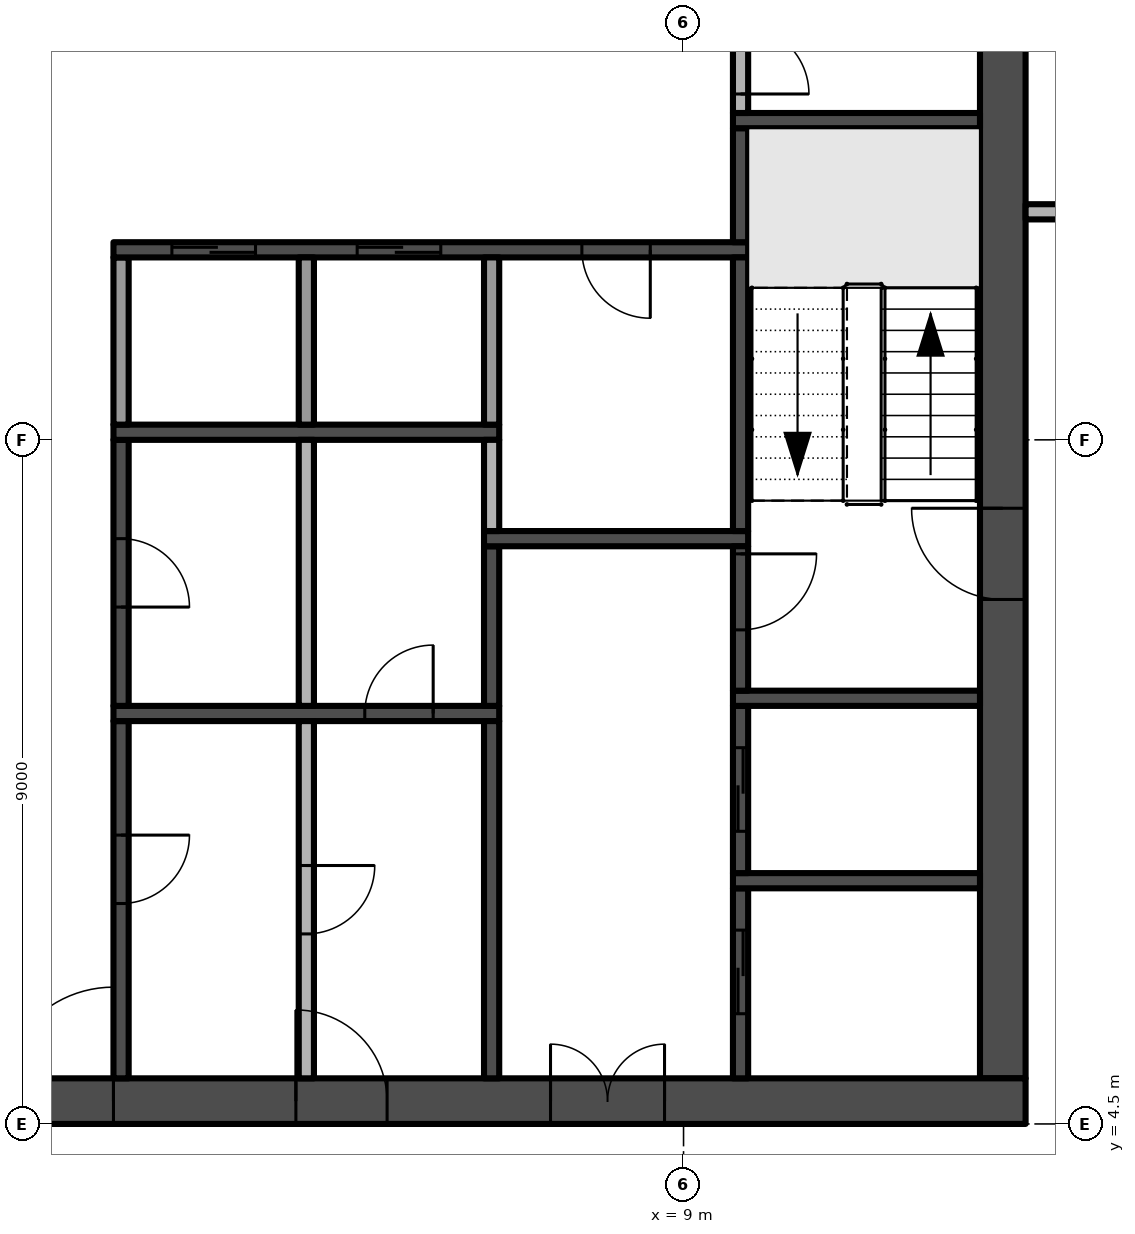
"""IFC4 building model, lengths in metres.
Left out: names, types, materials, properties, quantities, classifications, styles, units other than length and angle.
Written with IfcOpenShell. Run it as: python <this file> out.ifc"""

import sys

from ifc_helpers import new_model, si_unit, direction, frame, frame_2d, origin, place, context, subcontext, project, spatial, rectangle, extrude, element, fill, save


model = new_model("IFC4")
c1 = context("Model", 3, precision=1e-05, world=origin(), true_north=direction((0.0, 1.0)))
c2 = subcontext(c1, "Body", "Model", "MODEL_VIEW")
j1 = project(units=[si_unit("LENGTHUNIT", "METRE"), si_unit("PLANEANGLEUNIT", "RADIAN")], contexts=[c1])
p1 = place(None, origin())
s1 = spatial("IfcSite", under=j1, at=p1, CompositionType="ELEMENT")
p2 = place(p1, origin())
s2 = spatial("IfcBuilding", under=s1, at=p2, CompositionType="ELEMENT")
p3 = place(p2, frame((0.0, 0.0, 246.4)))
s3 = spatial("IfcBuildingStorey", under=s2, at=p3, CompositionType="ELEMENT", Elevation=246.4)
p4 = place(p3, frame((-13.5, 4.8, -0.3), z_axis=(0.0, 0.0, 1.0), x_axis=(1.0, 0.0, 0.0)))
e1 = element("IfcWall", 1, at=p4, inside=s3, PredefinedType="SHEAR", context=c2, shape_type="SweptSolid", body=[
    extrude(rectangle(XDim=27.0, YDim=0.6, at=frame_2d((13.5, 0.0))), origin(), (0.0, 0.0, 1.0), 3.8),
])
p5 = place(p4, frame((12.0, 0.0, 0.3)))
e2 = element("IfcOpeningElement", 2, at=p5, cuts=e1, PredefinedType="OPENING", context=c2, shape_type="SweptSolid", body=[
    extrude(rectangle(XDim=3.0, YDim=2.4, at=frame_2d((1.5, 1.2))), frame((0.0, 0.31, 0.0), z_axis=(0.0, -1.0, 0.0), x_axis=(1.0, 0.0, 0.0)), (0.0, 0.0, 1.0), 0.62),
])
p6 = place(p4, frame((4.9, 0.0, 0.3)))
e3 = element("IfcOpeningElement", 3, at=p6, cuts=e1, PredefinedType="OPENING", context=c2, shape_type="SweptSolid", body=[
    extrude(rectangle(XDim=1.2, YDim=2.2, at=frame_2d((0.6, 1.1))), frame((0.0, 0.31, 0.0), z_axis=(0.0, -1.0, 0.0), x_axis=(1.0, 0.0, 0.0)), (0.0, 0.0, 1.0), 0.62),
])
p7 = place(p4, frame((20.75, 0.0, 0.3)))
e4 = element("IfcOpeningElement", 4, at=p7, cuts=e1, PredefinedType="OPENING", context=c2, shape_type="SweptSolid", body=[
    extrude(rectangle(XDim=1.5, YDim=2.2, at=frame_2d((0.75, 1.1))), frame((0.0, 0.31, 0.0), z_axis=(0.0, -1.0, 0.0), x_axis=(1.0, 0.0, 0.0)), (0.0, 0.0, 1.0), 0.62),
])
p8 = place(p4, frame((17.4, 0.0, 0.3)))
e5 = element("IfcOpeningElement", 5, at=p8, cuts=e1, PredefinedType="OPENING", context=c2, shape_type="SweptSolid", body=[
    extrude(rectangle(XDim=1.2, YDim=2.2, at=frame_2d((0.6, 1.1))), frame((0.0, 0.31, 0.0), z_axis=(0.0, -1.0, 0.0), x_axis=(1.0, 0.0, 0.0)), (0.0, 0.0, 1.0), 0.62),
])
p9 = place(p3, frame((13.2, 5.1, -0.3), z_axis=(0.0, 0.0, 1.0), x_axis=(0.0, 1.0, 0.0)))
e6 = element("IfcWall", 6, at=p9, inside=s3, PredefinedType="SHEAR", context=c2, shape_type="SweptSolid", body=[
    extrude(rectangle(XDim=16.8, YDim=0.6, at=frame_2d((8.4, 0.0))), origin(), (0.0, 0.0, 1.0), 3.8),
])
p10 = place(p9, frame((6.3, 0.0, 0.3)))
e7 = element("IfcOpeningElement", 7, at=p10, cuts=e6, PredefinedType="OPENING", context=c2, shape_type="SweptSolid", body=[
    extrude(rectangle(XDim=1.2, YDim=2.2, at=frame_2d((0.6, 1.1))), frame((0.0, 0.31, 0.0), z_axis=(0.0, -1.0, 0.0), x_axis=(1.0, 0.0, 0.0)), (0.0, 0.0, 1.0), 0.62),
])
p11 = place(p3, frame((1.6, 9.8, 0.0), z_axis=(0.0, 0.0, 1.0), x_axis=(0.0, -1.0, 0.0)))
e8 = element("IfcWall", 8, at=p11, inside=s3, PredefinedType="SHEAR", context=c2, shape_type="SweptSolid", body=[
    extrude(rectangle(XDim=4.7, YDim=0.2, at=frame_2d((2.35, 0.0))), origin(), (0.0, 0.0, 1.0), 3.5),
])
p12 = place(p11, frame((1.5, 0.0, 0.0)))
e9 = element("IfcOpeningElement", 9, at=p12, cuts=e8, PredefinedType="OPENING", context=c2, shape_type="SweptSolid", body=[
    extrude(rectangle(XDim=0.9, YDim=2.1, at=frame_2d((0.45, 1.05))), frame((0.0, 0.11, 0.0), z_axis=(0.0, -1.0, 0.0), x_axis=(1.0, 0.0, 0.0)), (0.0, 0.0, 1.0), 0.22),
])
p13 = place(p3, frame((1.5, 9.9, 0.0), z_axis=(0.0, 0.0, 1.0), x_axis=(1.0, 0.0, 0.0)))
e10 = element("IfcWall", 10, at=p13, inside=s3, PredefinedType="SHEAR", context=c2, shape_type="SweptSolid", body=[
    extrude(rectangle(XDim=5.075, YDim=0.2, at=frame_2d((2.538, 0.0))), origin(), (0.0, 0.0, 1.0), 3.5),
])
p14 = place(p13, frame((3.306, 0.0, 0.0)))
e11 = element("IfcOpeningElement", 11, at=p14, cuts=e10, PredefinedType="OPENING", context=c2, shape_type="SweptSolid", body=[
    extrude(rectangle(XDim=0.9, YDim=2.1, at=frame_2d((0.45, 1.05))), frame((0.0, 0.11, 0.0), z_axis=(0.0, -1.0, 0.0), x_axis=(1.0, 0.0, 0.0)), (0.0, 0.0, 1.0), 0.22),
])
p15 = place(p3, frame((1.6, 13.5, 0.0), z_axis=(0.0, 0.0, 1.0), x_axis=(0.0, -1.0, 0.0)))
e12 = element("IfcWall", 12, at=p15, inside=s3, PredefinedType="SHEAR", context=c2, shape_type="SweptSolid", body=[
    extrude(rectangle(XDim=3.5, YDim=0.2, at=frame_2d((1.75, 0.0))), origin(), (0.0, 0.0, 1.0), 3.5),
])
p16 = place(p15, frame((1.3, 0.0, 0.0)))
e13 = element("IfcOpeningElement", 13, at=p16, cuts=e12, PredefinedType="OPENING", context=c2, shape_type="SweptSolid", body=[
    extrude(rectangle(XDim=0.9, YDim=2.1, at=frame_2d((0.45, 1.05))), frame((0.0, 0.11, 0.0), z_axis=(0.0, -1.0, 0.0), x_axis=(1.0, 0.0, 0.0)), (0.0, 0.0, 1.0), 0.22),
])
p17 = place(p3, frame((1.5, 13.6, 0.0), z_axis=(0.0, 0.0, 1.0), x_axis=(1.0, 0.0, 0.0)))
e14 = element("IfcWall", 14, at=p17, inside=s3, PredefinedType="SHEAR", context=c2, shape_type="SweptSolid", body=[
    extrude(rectangle(XDim=5.075, YDim=0.2, at=frame_2d((2.538, 0.0))), origin(), (0.0, 0.0, 1.0), 3.5),
])
p18 = place(p3, frame((1.6, 13.7, 0.0), z_axis=(0.0, 0.0, 1.0), x_axis=(0.0, 1.0, 0.0)))
e15 = element("IfcWall", 15, at=p18, inside=s3, PredefinedType="PARTITIONING", context=c2, shape_type="SweptSolid", body=[
    extrude(rectangle(XDim=2.2, YDim=0.2, at=frame_2d((1.1, 0.0))), origin(), (0.0, 0.0, 1.0), 3.5),
])
p19 = place(p3, frame((9.85, 16.0, 0.0), z_axis=(0.0, 0.0, 1.0), x_axis=(-1.0, 0.0, 0.0)))
e16 = element("IfcWall", 16, at=p19, inside=s3, PredefinedType="SHEAR", context=c2, shape_type="SweptSolid", body=[
    extrude(rectangle(XDim=8.35, YDim=0.2, at=frame_2d((4.175, 0.0))), origin(), (0.0, 0.0, 1.0), 3.5),
])
p20 = place(p19, frame((6.481, 0.0, 0.0)))
e17 = element("IfcOpeningElement", 17, at=p20, cuts=e16, PredefinedType="OPENING", context=c2, shape_type="SweptSolid", body=[
    extrude(rectangle(XDim=1.1, YDim=2.1, at=frame_2d((0.55, 1.05))), frame((0.0, 0.11, 0.0), z_axis=(0.0, -1.0, 0.0), x_axis=(1.0, 0.0, 0.0)), (0.0, 0.0, 1.0), 0.22),
])
p21 = place(p19, frame((4.044, 0.0, 0.0)))
e18 = element("IfcOpeningElement", 18, at=p21, cuts=e16, PredefinedType="OPENING", context=c2, shape_type="SweptSolid", body=[
    extrude(rectangle(XDim=1.1, YDim=2.1, at=frame_2d((0.55, 1.05))), frame((0.0, 0.11, 0.0), z_axis=(0.0, -1.0, 0.0), x_axis=(1.0, 0.0, 0.0)), (0.0, 0.0, 1.0), 0.22),
])
p22 = place(p19, frame((1.288, 0.0, 0.0)))
e19 = element("IfcOpeningElement", 19, at=p22, cuts=e16, PredefinedType="OPENING", context=c2, shape_type="SweptSolid", body=[
    extrude(rectangle(XDim=0.9, YDim=2.1, at=frame_2d((0.45, 1.05))), frame((0.0, 0.11, 0.0), z_axis=(0.0, -1.0, 0.0), x_axis=(1.0, 0.0, 0.0)), (0.0, 0.0, 1.0), 0.22),
])
p23 = place(p3, frame((4.037, 9.8, 0.0), z_axis=(0.0, 0.0, 1.0), x_axis=(0.0, -1.0, 0.0)))
e20 = element("IfcWall", 20, at=p23, inside=s3, PredefinedType="PARTITIONING", context=c2, shape_type="SweptSolid", body=[
    extrude(rectangle(XDim=4.7, YDim=0.2, at=frame_2d((2.35, 0.0))), origin(), (0.0, 0.0, 1.0), 3.5),
])
p24 = place(p23, frame((1.9, 0.0, 0.0)))
e21 = element("IfcOpeningElement", 21, at=p24, cuts=e20, PredefinedType="OPENING", context=c2, shape_type="SweptSolid", body=[
    extrude(rectangle(XDim=0.9, YDim=2.1, at=frame_2d((0.45, 1.05))), frame((0.0, 0.11, 0.0), z_axis=(0.0, -1.0, 0.0), x_axis=(1.0, 0.0, 0.0)), (0.0, 0.0, 1.0), 0.22),
])
p25 = place(p3, frame((4.037, 10.0, 0.0), z_axis=(0.0, 0.0, 1.0), x_axis=(0.0, 1.0, 0.0)))
e22 = element("IfcWall", 22, at=p25, inside=s3, PredefinedType="PARTITIONING", context=c2, shape_type="SweptSolid", body=[
    extrude(rectangle(XDim=3.5, YDim=0.2, at=frame_2d((1.75, 0.0))), origin(), (0.0, 0.0, 1.0), 3.5),
])
p26 = place(p3, frame((4.037, 13.7, 0.0), z_axis=(0.0, 0.0, 1.0), x_axis=(0.0, 1.0, 0.0)))
e23 = element("IfcWall", 23, at=p26, inside=s3, PredefinedType="PARTITIONING", context=c2, shape_type="SweptSolid", body=[
    extrude(rectangle(XDim=2.2, YDim=0.2, at=frame_2d((1.1, 0.0))), origin(), (0.0, 0.0, 1.0), 3.5),
])
p27 = place(p3, frame((6.475, 5.1, 0.0), z_axis=(0.0, 0.0, 1.0), x_axis=(0.0, 1.0, 0.0)))
e24 = element("IfcWall", 24, at=p27, inside=s3, PredefinedType="SHEAR", context=c2, shape_type="SweptSolid", body=[
    extrude(rectangle(XDim=4.7, YDim=0.2, at=frame_2d((2.35, 0.0))), origin(), (0.0, 0.0, 1.0), 3.5),
])
p28 = place(p3, frame((6.475, 10.0, 0.0), z_axis=(0.0, 0.0, 1.0), x_axis=(0.0, 1.0, 0.0)))
e25 = element("IfcWall", 25, at=p28, inside=s3, PredefinedType="SHEAR", context=c2, shape_type="SweptSolid", body=[
    extrude(rectangle(XDim=2.1, YDim=0.2, at=frame_2d((1.05, 0.0))), origin(), (0.0, 0.0, 1.0), 3.5),
])
p29 = place(p3, frame((6.375, 12.2, 0.0), z_axis=(0.0, 0.0, 1.0), x_axis=(1.0, 0.0, 0.0)))
e26 = element("IfcWall", 26, at=p29, inside=s3, PredefinedType="SHEAR", context=c2, shape_type="SweptSolid", body=[
    extrude(rectangle(XDim=3.475, YDim=0.2, at=frame_2d((1.738, 0.0))), origin(), (0.0, 0.0, 1.0), 3.5),
])
p30 = place(p3, frame((6.475, 12.3, 0.0), z_axis=(0.0, 0.0, 1.0), x_axis=(0.0, 1.0, 0.0)))
e27 = element("IfcWall", 27, at=p30, inside=s3, PredefinedType="PARTITIONING", context=c2, shape_type="SweptSolid", body=[
    extrude(rectangle(XDim=1.2, YDim=0.2, at=frame_2d((0.6, 0.0))), origin(), (0.0, 0.0, 1.0), 3.5),
])
p31 = place(p3, frame((6.475, 13.7, 0.0), z_axis=(0.0, 0.0, 1.0), x_axis=(0.0, 1.0, 0.0)))
e28 = element("IfcWall", 28, at=p31, inside=s3, PredefinedType="PARTITIONING", context=c2, shape_type="SweptSolid", body=[
    extrude(rectangle(XDim=2.2, YDim=0.2, at=frame_2d((1.1, 0.0))), origin(), (0.0, 0.0, 1.0), 3.5),
])
p32 = place(p3, frame((9.75, 5.1, 0.0), z_axis=(0.0, 0.0, 1.0), x_axis=(0.0, 1.0, 0.0)))
e29 = element("IfcWall", 29, at=p32, inside=s3, PredefinedType="SHEAR", context=c2, shape_type="SweptSolid", body=[
    extrude(rectangle(XDim=2.5, YDim=0.2, at=frame_2d((1.25, 0.0))), origin(), (0.0, 0.0, 1.0), 3.5),
])
p33 = place(p32, frame((0.85, 0.0, 0.0)))
e30 = element("IfcOpeningElement", 30, at=p33, cuts=e29, PredefinedType="OPENING", context=c2, shape_type="SweptSolid", body=[
    extrude(rectangle(XDim=1.1, YDim=2.1, at=frame_2d((0.55, 1.05))), frame((0.0, 0.11, 0.0), z_axis=(0.0, -1.0, 0.0), x_axis=(1.0, 0.0, 0.0)), (0.0, 0.0, 1.0), 0.22),
])
p34 = place(p3, frame((9.65, 7.7, 0.0), z_axis=(0.0, 0.0, 1.0), x_axis=(1.0, 0.0, 0.0)))
e31 = element("IfcWall", 31, at=p34, inside=s3, PredefinedType="SHEAR", context=c2, shape_type="SweptSolid", body=[
    extrude(rectangle(XDim=3.25, YDim=0.2, at=frame_2d((1.625, 0.0))), origin(), (0.0, 0.0, 1.0), 3.5),
])
p35 = place(p3, frame((9.75, 7.8, 0.0), z_axis=(0.0, 0.0, 1.0), x_axis=(0.0, 1.0, 0.0)))
e32 = element("IfcWall", 32, at=p35, inside=s3, PredefinedType="SHEAR", context=c2, shape_type="SweptSolid", body=[
    extrude(rectangle(XDim=2.2, YDim=0.2, at=frame_2d((1.1, 0.0))), origin(), (0.0, 0.0, 1.0), 3.5),
])
p36 = place(p35, frame((0.55, 0.0, 0.0)))
e33 = element("IfcOpeningElement", 33, at=p36, cuts=e32, PredefinedType="OPENING", context=c2, shape_type="SweptSolid", body=[
    extrude(rectangle(XDim=1.1, YDim=2.1, at=frame_2d((0.55, 1.05))), frame((0.0, 0.11, 0.0), z_axis=(0.0, -1.0, 0.0), x_axis=(1.0, 0.0, 0.0)), (0.0, 0.0, 1.0), 0.22),
])
p37 = place(p3, frame((9.65, 10.1, 0.0), z_axis=(0.0, 0.0, 1.0), x_axis=(1.0, 0.0, 0.0)))
e34 = element("IfcWall", 34, at=p37, inside=s3, PredefinedType="SHEAR", context=c2, shape_type="SweptSolid", body=[
    extrude(rectangle(XDim=3.25, YDim=0.2, at=frame_2d((1.625, 0.0))), origin(), (0.0, 0.0, 1.0), 3.5),
])
p38 = place(p3, frame((9.75, 12.1, 0.0), z_axis=(0.0, 0.0, 1.0), x_axis=(0.0, -1.0, 0.0)))
e35 = element("IfcWall", 35, at=p38, inside=s3, PredefinedType="SHEAR", context=c2, shape_type="SweptSolid", body=[
    extrude(rectangle(XDim=1.9, YDim=0.2, at=frame_2d((0.95, 0.0))), origin(), (0.0, 0.0, 1.0), 3.5),
])
p39 = place(p38, frame((0.1, 0.0, 0.0)))
e36 = element("IfcOpeningElement", 36, at=p39, cuts=e35, PredefinedType="OPENING", context=c2, shape_type="SweptSolid", body=[
    extrude(rectangle(XDim=1.0, YDim=2.2, at=frame_2d((0.5, 1.1))), frame((0.0, 0.11, 0.0), z_axis=(0.0, -1.0, 0.0), x_axis=(1.0, 0.0, 0.0)), (0.0, 0.0, 1.0), 0.22),
])
p40 = place(p3, frame((9.75, 12.3, 0.0), z_axis=(0.0, 0.0, 1.0), x_axis=(0.0, 1.0, 0.0)))
e37 = element("IfcWall", 37, at=p40, inside=s3, PredefinedType="SHEAR", context=c2, shape_type="SweptSolid", body=[
    extrude(rectangle(XDim=3.6, YDim=0.2, at=frame_2d((1.8, 0.0))), origin(), (0.0, 0.0, 1.0), 3.5),
])
p41 = place(p3, frame((9.75, 16.1, 0.0), z_axis=(0.0, 0.0, 1.0), x_axis=(0.0, 1.0, 0.0)))
e38 = element("IfcWall", 38, at=p41, inside=s3, PredefinedType="SHEAR", context=c2, shape_type="SweptSolid", body=[
    extrude(rectangle(XDim=1.5, YDim=0.2, at=frame_2d((0.75, 0.0))), origin(), (0.0, 0.0, 1.0), 3.5),
])
p42 = place(p3, frame((9.65, 17.7, 0.0), z_axis=(0.0, 0.0, 1.0), x_axis=(1.0, 0.0, 0.0)))
e39 = element("IfcWall", 39, at=p42, inside=s3, PredefinedType="SHEAR", context=c2, shape_type="SweptSolid", body=[
    extrude(rectangle(XDim=3.25, YDim=0.2, at=frame_2d((1.625, 0.0))), origin(), (0.0, 0.0, 1.0), 3.5),
])
p43 = place(p3, frame((9.75, 19.2, 0.0), z_axis=(0.0, 0.0, 1.0), x_axis=(0.0, -1.0, 0.0)))
e40 = element("IfcWall", 40, at=p43, inside=s3, PredefinedType="PARTITIONING", context=c2, shape_type="SweptSolid", body=[
    extrude(rectangle(XDim=1.4, YDim=0.2, at=frame_2d((0.7, 0.0))), origin(), (0.0, 0.0, 1.0), 3.5),
])
p44 = place(p43, frame((0.25, 0.0, 0.0)))
e41 = element("IfcOpeningElement", 41, at=p44, cuts=e40, PredefinedType="OPENING", context=c2, shape_type="SweptSolid", body=[
    extrude(rectangle(XDim=0.9, YDim=2.1, at=frame_2d((0.45, 1.05))), frame((0.0, 0.11, 0.0), z_axis=(0.0, -1.0, 0.0), x_axis=(1.0, 0.0, 0.0)), (0.0, 0.0, 1.0), 0.22),
])
p45 = place(p3, frame((13.5, 16.5, 0.0), z_axis=(0.0, 0.0, 1.0), x_axis=(1.0, 0.0, 0.0)))
e42 = element("IfcWall", 42, at=p45, inside=s3, PredefinedType="PARTITIONING", context=c2, shape_type="SweptSolid", body=[
    extrude(rectangle(XDim=3.825, YDim=0.2, at=frame_2d((1.913, 0.0))), origin(), (0.0, 0.0, 1.0), 3.5),
])
p46 = place(p45, frame((1.55, 0.0, 0.0)))
e43 = element("IfcOpeningElement", 43, at=p46, cuts=e42, PredefinedType="OPENING", context=c2, shape_type="SweptSolid", body=[
    extrude(rectangle(XDim=0.9, YDim=2.1, at=frame_2d((0.45, 1.05))), frame((0.0, 0.11, 0.0), z_axis=(0.0, -1.0, 0.0), x_axis=(1.0, 0.0, 0.0)), (0.0, 0.0, 1.0), 0.22),
])
p47 = place(p5, frame((3.0, 0.0, 0.0), z_axis=(0.0, 0.0, 1.0), x_axis=(-1.0, 0.0, 0.0)))
e44 = element("IfcDoor", 44, at=p47, inside=s3, OperationType="DOUBLE_DOOR_SINGLE_SWING", PredefinedType="DOOR", context=c2, shape_type="SweptSolid", body=[
    extrude(rectangle(XDim=3.0, YDim=2.4, at=frame_2d((1.5, 1.2))), frame((0.0, 0.025, 0.0), z_axis=(0.0, -1.0, 0.0), x_axis=(1.0, 0.0, 0.0)), (0.0, 0.0, 1.0), 0.05),
])
fill(e2, e44)
p48 = place(p10, frame((1.2, 0.0, 0.0), z_axis=(0.0, 0.0, 1.0), x_axis=(-1.0, 0.0, 0.0)))
e45 = element("IfcDoor", 45, at=p48, inside=s3, OperationType="SINGLE_SWING_LEFT", PredefinedType="DOOR", context=c2, shape_type="SweptSolid", body=[
    extrude(rectangle(XDim=1.2, YDim=2.2, at=frame_2d((0.6, 1.1))), frame((0.0, 0.025, 0.0), z_axis=(0.0, -1.0, 0.0), x_axis=(1.0, 0.0, 0.0)), (0.0, 0.0, 1.0), 0.05),
])
fill(e7, e45)
p49 = place(p7, frame((1.5, 0.0, 0.0), z_axis=(0.0, 0.0, 1.0), x_axis=(-1.0, 0.0, 0.0)))
e46 = element("IfcDoor", 46, at=p49, inside=s3, OperationType="DOUBLE_DOOR_SINGLE_SWING", PredefinedType="DOOR", context=c2, shape_type="SweptSolid", body=[
    extrude(rectangle(XDim=1.5, YDim=2.2, at=frame_2d((0.75, 1.1))), frame((0.0, 0.025, 0.0), z_axis=(0.0, -1.0, 0.0), x_axis=(1.0, 0.0, 0.0)), (0.0, 0.0, 1.0), 0.05),
])
fill(e4, e46)
p50 = place(p8, frame((1.2, 0.0, 0.0), z_axis=(0.0, 0.0, 1.0), x_axis=(-1.0, 0.0, 0.0)))
e47 = element("IfcDoor", 47, at=p50, inside=s3, OperationType="SINGLE_SWING_RIGHT", PredefinedType="DOOR", context=c2, shape_type="SweptSolid", body=[
    extrude(rectangle(XDim=1.2, YDim=2.2, at=frame_2d((0.6, 1.1))), frame((0.0, 0.025, 0.0), z_axis=(0.0, -1.0, 0.0), x_axis=(1.0, 0.0, 0.0)), (0.0, 0.0, 1.0), 0.05),
])
fill(e5, e47)
p51 = place(p39, origin())
e48 = element("IfcDoor", 48, at=p51, inside=s3, OperationType="SINGLE_SWING_LEFT", PredefinedType="DOOR", context=c2, shape_type="SweptSolid", body=[
    extrude(rectangle(XDim=1.0, YDim=2.2, at=frame_2d((0.5, 1.1))), frame((0.0, 0.025, 0.0), z_axis=(0.0, -1.0, 0.0), x_axis=(1.0, 0.0, 0.0)), (0.0, 0.0, 1.0), 0.05),
])
fill(e36, e48)
p52 = place(p20, origin())
e49 = element("IfcDoor", 49, at=p52, inside=s3, OperationType="SLIDING_TO_RIGHT", PredefinedType="DOOR", context=c2, shape_type="SweptSolid", body=[
    extrude(rectangle(XDim=1.1, YDim=2.1, at=frame_2d((0.55, 1.05))), frame((0.0, 0.025, 0.0), z_axis=(0.0, -1.0, 0.0), x_axis=(1.0, 0.0, 0.0)), (0.0, 0.0, 1.0), 0.05),
])
fill(e17, e49)
p53 = place(p21, origin())
e50 = element("IfcDoor", 50, at=p53, inside=s3, OperationType="SLIDING_TO_RIGHT", PredefinedType="DOOR", context=c2, shape_type="SweptSolid", body=[
    extrude(rectangle(XDim=1.1, YDim=2.1, at=frame_2d((0.55, 1.05))), frame((0.0, 0.025, 0.0), z_axis=(0.0, -1.0, 0.0), x_axis=(1.0, 0.0, 0.0)), (0.0, 0.0, 1.0), 0.05),
])
fill(e18, e50)
p54 = place(p33, origin())
e51 = element("IfcDoor", 51, at=p54, inside=s3, OperationType="SLIDING_TO_RIGHT", PredefinedType="DOOR", context=c2, shape_type="SweptSolid", body=[
    extrude(rectangle(XDim=1.1, YDim=2.1, at=frame_2d((0.55, 1.05))), frame((0.0, 0.025, 0.0), z_axis=(0.0, -1.0, 0.0), x_axis=(1.0, 0.0, 0.0)), (0.0, 0.0, 1.0), 0.05),
])
fill(e30, e51)
p55 = place(p36, origin())
e52 = element("IfcDoor", 52, at=p55, inside=s3, OperationType="SLIDING_TO_RIGHT", PredefinedType="DOOR", context=c2, shape_type="SweptSolid", body=[
    extrude(rectangle(XDim=1.1, YDim=2.1, at=frame_2d((0.55, 1.05))), frame((0.0, 0.025, 0.0), z_axis=(0.0, -1.0, 0.0), x_axis=(1.0, 0.0, 0.0)), (0.0, 0.0, 1.0), 0.05),
])
fill(e33, e52)
p56 = place(p12, origin())
e53 = element("IfcDoor", 53, at=p56, inside=s3, OperationType="SINGLE_SWING_LEFT", PredefinedType="DOOR", context=c2, shape_type="SweptSolid", body=[
    extrude(rectangle(XDim=0.9, YDim=2.1, at=frame_2d((0.45, 1.05))), frame((0.0, 0.025, 0.0), z_axis=(0.0, -1.0, 0.0), x_axis=(1.0, 0.0, 0.0)), (0.0, 0.0, 1.0), 0.05),
])
fill(e9, e53)
p57 = place(p24, origin())
e54 = element("IfcDoor", 54, at=p57, inside=s3, OperationType="SINGLE_SWING_LEFT", PredefinedType="DOOR", context=c2, shape_type="SweptSolid", body=[
    extrude(rectangle(XDim=0.9, YDim=2.1, at=frame_2d((0.45, 1.05))), frame((0.0, 0.025, 0.0), z_axis=(0.0, -1.0, 0.0), x_axis=(1.0, 0.0, 0.0)), (0.0, 0.0, 1.0), 0.05),
])
fill(e21, e54)
p58 = place(p16, origin())
e55 = element("IfcDoor", 55, at=p58, inside=s3, OperationType="SINGLE_SWING_RIGHT", PredefinedType="DOOR", context=c2, shape_type="SweptSolid", body=[
    extrude(rectangle(XDim=0.9, YDim=2.1, at=frame_2d((0.45, 1.05))), frame((0.0, 0.025, 0.0), z_axis=(0.0, -1.0, 0.0), x_axis=(1.0, 0.0, 0.0)), (0.0, 0.0, 1.0), 0.05),
])
fill(e13, e55)
p59 = place(p14, origin())
e56 = element("IfcDoor", 56, at=p59, inside=s3, OperationType="SINGLE_SWING_RIGHT", PredefinedType="DOOR", context=c2, shape_type="SweptSolid", body=[
    extrude(rectangle(XDim=0.9, YDim=2.1, at=frame_2d((0.45, 1.05))), frame((0.0, 0.025, 0.0), z_axis=(0.0, -1.0, 0.0), x_axis=(1.0, 0.0, 0.0)), (0.0, 0.0, 1.0), 0.05),
])
fill(e11, e56)
p60 = place(p22, origin())
e57 = element("IfcDoor", 57, at=p60, inside=s3, OperationType="SINGLE_SWING_LEFT", PredefinedType="DOOR", context=c2, shape_type="SweptSolid", body=[
    extrude(rectangle(XDim=0.9, YDim=2.1, at=frame_2d((0.45, 1.05))), frame((0.0, 0.025, 0.0), z_axis=(0.0, -1.0, 0.0), x_axis=(1.0, 0.0, 0.0)), (0.0, 0.0, 1.0), 0.05),
])
fill(e19, e57)
p61 = place(p44, origin())
e58 = element("IfcDoor", 58, at=p61, inside=s3, OperationType="SINGLE_SWING_RIGHT", PredefinedType="DOOR", context=c2, shape_type="SweptSolid", body=[
    extrude(rectangle(XDim=0.9, YDim=2.1, at=frame_2d((0.45, 1.05))), frame((0.0, 0.025, 0.0), z_axis=(0.0, -1.0, 0.0), x_axis=(1.0, 0.0, 0.0)), (0.0, 0.0, 1.0), 0.05),
])
fill(e41, e58)
save(model, sys.argv[1])
